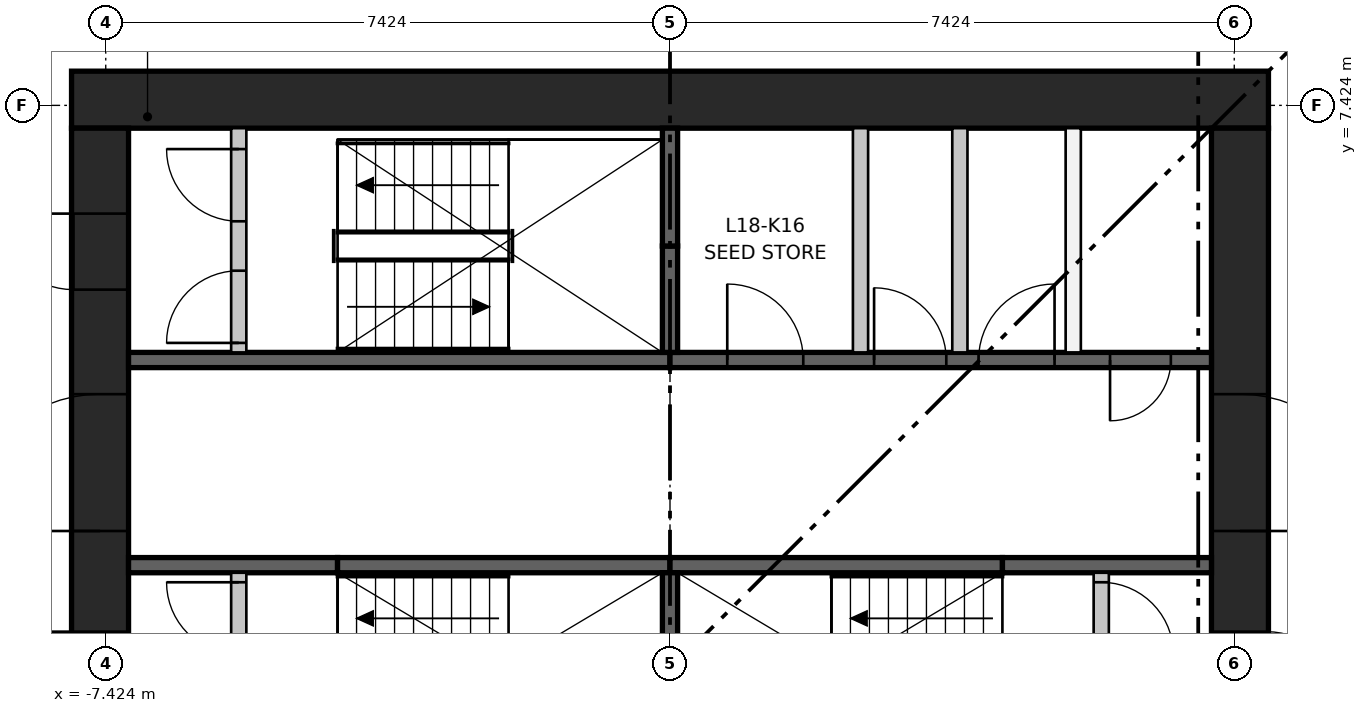
"""IFC4 building model, lengths in metres.
Left out: names, types, materials, properties, quantities, classifications, styles, units other than length and angle.
Written with IfcOpenShell. Run it as: python <this file> out.ifc"""

import sys

from ifc_helpers import new_model, si_unit, direction, frame, frame_2d, origin, place, context, subcontext, project, spatial, rectangle, extrude, element, fill, save


model = new_model("IFC4")
c1 = context("Model", 3, precision=1e-05, world=origin(), true_north=direction((0.0, 1.0)))
c2 = subcontext(c1, "Body", "Model", "MODEL_VIEW")
j1 = project(units=[si_unit("LENGTHUNIT", "METRE"), si_unit("PLANEANGLEUNIT", "RADIAN")], contexts=[c1])
p1 = place(None, origin())
s1 = spatial("IfcSite", under=j1, at=p1, CompositionType="ELEMENT")
p2 = place(p1, origin())
s2 = spatial("IfcBuilding", under=s1, at=p2, CompositionType="ELEMENT")
p3 = place(p2, frame((0.0, 0.0, 72.75)))
s3 = spatial("IfcBuildingStorey", under=s2, at=p3, CompositionType="ELEMENT", Elevation=72.75)
p4 = place(p3, frame((-7.874, 7.499, 0.0), z_axis=(0.0, 0.0, 1.0), x_axis=(1.0, 0.0, 0.0)))
e1 = element("IfcWall", 1, at=p4, inside=s3, PredefinedType="SHEAR", context=c2, shape_type="SweptSolid", body=[
    extrude(rectangle(XDim=15.748, YDim=0.75, at=frame_2d((7.874, 0.0))), origin(), (0.0, 0.0, 1.0), 3.65),
])
p5 = place(p3, frame((-7.499, -7.124, 0.0), z_axis=(0.0, 0.0, 1.0), x_axis=(0.0, 1.0, 0.0)))
e2 = element("IfcWall", 2, at=p5, inside=s3, PredefinedType="SHEAR", context=c2, shape_type="SweptSolid", body=[
    extrude(rectangle(XDim=14.248, YDim=0.75, at=frame_2d((7.124, 0.0))), origin(), (0.0, 0.0, 1.0), 3.65),
])
p6 = place(p5, frame((6.624, 0.0, 0.0)))
e3 = element("IfcOpeningElement", 3, at=p6, cuts=e2, PredefinedType="OPENING", context=c2, shape_type="SweptSolid", body=[
    extrude(rectangle(XDim=1.0, YDim=2.1, at=frame_2d((0.5, 1.05))), frame((0.0, 0.385, 0.0), z_axis=(0.0, -1.0, 0.0), x_axis=(1.0, 0.0, 0.0)), (0.0, 0.0, 1.0), 0.77),
])
p7 = place(p5, frame((3.5, 0.0, 0.0)))
e4 = element("IfcOpeningElement", 4, at=p7, cuts=e2, PredefinedType="OPENING", context=c2, shape_type="SweptSolid", body=[
    extrude(rectangle(XDim=1.8, YDim=2.1, at=frame_2d((0.9, 1.05))), frame((0.0, 0.385, 0.0), z_axis=(0.0, -1.0, 0.0), x_axis=(1.0, 0.0, 0.0)), (0.0, 0.0, 1.0), 0.77),
])
p8 = place(p5, frame((8.948, 0.0, 0.0)))
e5 = element("IfcOpeningElement", 5, at=p8, cuts=e2, PredefinedType="OPENING", context=c2, shape_type="SweptSolid", body=[
    extrude(rectangle(XDim=1.8, YDim=2.1, at=frame_2d((0.9, 1.05))), frame((0.0, 0.385, 0.0), z_axis=(0.0, -1.0, 0.0), x_axis=(1.0, 0.0, 0.0)), (0.0, 0.0, 1.0), 0.77),
])
p9 = place(p5, frame((12.124, 0.0, 0.0)))
e6 = element("IfcOpeningElement", 6, at=p9, cuts=e2, PredefinedType="OPENING", context=c2, shape_type="SweptSolid", body=[
    extrude(rectangle(XDim=1.0, YDim=2.1, at=frame_2d((0.5, 1.05))), frame((0.0, 0.385, 0.0), z_axis=(0.0, -1.0, 0.0), x_axis=(1.0, 0.0, 0.0)), (0.0, 0.0, 1.0), 0.77),
])
p10 = place(p3, frame((7.499, -7.124, 0.0), z_axis=(0.0, 0.0, 1.0), x_axis=(0.0, 1.0, 0.0)))
e7 = element("IfcWall", 7, at=p10, inside=s3, PredefinedType="SHEAR", context=c2, shape_type="SweptSolid", body=[
    extrude(rectangle(XDim=14.248, YDim=0.75, at=frame_2d((7.124, 0.0))), origin(), (0.0, 0.0, 1.0), 3.65),
])
p11 = place(p10, frame((6.624, 0.0, 0.0)))
e8 = element("IfcOpeningElement", 8, at=p11, cuts=e7, PredefinedType="OPENING", context=c2, shape_type="SweptSolid", body=[
    extrude(rectangle(XDim=1.0, YDim=2.1, at=frame_2d((0.5, 1.05))), frame((0.0, 0.385, 0.0), z_axis=(0.0, -1.0, 0.0), x_axis=(1.0, 0.0, 0.0)), (0.0, 0.0, 1.0), 0.77),
])
p12 = place(p10, frame((3.5, 0.0, 0.0)))
e9 = element("IfcOpeningElement", 9, at=p12, cuts=e7, PredefinedType="OPENING", context=c2, shape_type="SweptSolid", body=[
    extrude(rectangle(XDim=1.8, YDim=2.1, at=frame_2d((0.9, 1.05))), frame((0.0, 0.385, 0.0), z_axis=(0.0, -1.0, 0.0), x_axis=(1.0, 0.0, 0.0)), (0.0, 0.0, 1.0), 0.77),
])
p13 = place(p10, frame((8.948, 0.0, 0.0)))
e10 = element("IfcOpeningElement", 10, at=p13, cuts=e7, PredefinedType="OPENING", context=c2, shape_type="SweptSolid", body=[
    extrude(rectangle(XDim=1.8, YDim=2.1, at=frame_2d((0.9, 1.05))), frame((0.0, 0.385, 0.0), z_axis=(0.0, -1.0, 0.0), x_axis=(1.0, 0.0, 0.0)), (0.0, 0.0, 1.0), 0.77),
])
p14 = place(p3, frame((-7.124, 4.074, 0.0), z_axis=(0.0, 0.0, 1.0), x_axis=(1.0, 0.0, 0.0)))
e11 = element("IfcWall", 11, at=p14, inside=s3, PredefinedType="SHEAR", context=c2, shape_type="SweptSolid", body=[
    extrude(rectangle(XDim=7.124, YDim=0.2, at=frame_2d((3.562, 0.0))), origin(), (0.0, 0.0, 1.0), 3.3),
])
p15 = place(p3, frame((0.0, 4.074, 0.0), z_axis=(0.0, 0.0, 1.0), x_axis=(1.0, 0.0, 0.0)))
e12 = element("IfcWall", 12, at=p15, inside=s3, PredefinedType="SHEAR", context=c2, shape_type="SweptSolid", body=[
    extrude(rectangle(XDim=7.124, YDim=0.2, at=frame_2d((3.562, 0.0))), origin(), (0.0, 0.0, 1.0), 3.3),
])
p16 = place(p15, frame((0.753, 0.0, 0.0)))
e13 = element("IfcOpeningElement", 13, at=p16, cuts=e12, PredefinedType="OPENING", context=c2, shape_type="SweptSolid", body=[
    extrude(rectangle(XDim=1.0, YDim=2.1, at=frame_2d((0.5, 1.05))), frame((0.0, 0.11, 0.0), z_axis=(0.0, -1.0, 0.0), x_axis=(1.0, 0.0, 0.0)), (0.0, 0.0, 1.0), 0.22),
])
p17 = place(p15, frame((2.685, 0.0, 0.0)))
e14 = element("IfcOpeningElement", 14, at=p17, cuts=e12, PredefinedType="OPENING", context=c2, shape_type="SweptSolid", body=[
    extrude(rectangle(XDim=0.95, YDim=2.1, at=frame_2d((0.475, 1.05))), frame((0.0, 0.11, 0.0), z_axis=(0.0, -1.0, 0.0), x_axis=(1.0, 0.0, 0.0)), (0.0, 0.0, 1.0), 0.22),
])
p18 = place(p15, frame((4.06, 0.0, 0.0)))
e15 = element("IfcOpeningElement", 15, at=p18, cuts=e12, PredefinedType="OPENING", context=c2, shape_type="SweptSolid", body=[
    extrude(rectangle(XDim=1.0, YDim=2.1, at=frame_2d((0.5, 1.05))), frame((0.0, 0.11, 0.0), z_axis=(0.0, -1.0, 0.0), x_axis=(1.0, 0.0, 0.0)), (0.0, 0.0, 1.0), 0.22),
])
p19 = place(p15, frame((5.79, 0.0, 0.0)))
e16 = element("IfcOpeningElement", 16, at=p19, cuts=e12, PredefinedType="OPENING", context=c2, shape_type="SweptSolid", body=[
    extrude(rectangle(XDim=0.8, YDim=2.1, at=frame_2d((0.4, 1.05))), frame((0.0, 0.11, 0.0), z_axis=(0.0, -1.0, 0.0), x_axis=(1.0, 0.0, 0.0)), (0.0, 0.0, 1.0), 0.22),
])
p20 = place(p3, frame((-7.124, 1.375, 0.0), z_axis=(0.0, 0.0, 1.0), x_axis=(1.0, 0.0, 0.0)))
e17 = element("IfcWall", 17, at=p20, inside=s3, PredefinedType="SHEAR", context=c2, shape_type="SweptSolid", body=[
    extrude(rectangle(XDim=2.75, YDim=0.2, at=frame_2d((1.375, 0.0))), origin(), (0.0, 0.0, 1.0), 3.3),
])
for number, where, z_axis, x_axis in (
    (18, (-4.374, 1.375, 0.0), (0.0, 0.0, 1.0), (1.0, 0.0, 0.0)),
    (19, (0.0, 1.375, 0.0), (0.0, 0.0, 1.0), (1.0, 0.0, 0.0)),
):
    element("IfcWall", number, at=place(p3, frame(where, z_axis=z_axis, x_axis=x_axis)), inside=s3, PredefinedType="SHEAR", context=c2, shape_type="SweptSolid", body=[
        extrude(rectangle(XDim=4.374, YDim=0.2, at=frame_2d((2.187, 0.0))), origin(), (0.0, 0.0, 1.0), 3.3),
    ])
p21 = place(p3, frame((4.374, 1.375, 0.0), z_axis=(0.0, 0.0, 1.0), x_axis=(1.0, 0.0, 0.0)))
e20 = element("IfcWall", 20, at=p21, inside=s3, PredefinedType="SHEAR", context=c2, shape_type="SweptSolid", body=[
    extrude(rectangle(XDim=2.75, YDim=0.2, at=frame_2d((1.375, 0.0))), origin(), (0.0, 0.0, 1.0), 3.3),
])
p22 = place(p3, frame((0.0, -1.275, 0.0), z_axis=(0.0, 0.0, 1.0), x_axis=(0.0, 1.0, 0.0)))
e21 = element("IfcWall", 21, at=p22, inside=s3, PredefinedType="SHEAR", context=c2, shape_type="SweptSolid", body=[
    extrude(rectangle(XDim=2.55, YDim=0.2, at=frame_2d((1.275, 0.0))), origin(), (0.0, 0.0, 1.0), 3.3),
])
p23 = place(p3, frame((0.0, 4.174, 0.0), z_axis=(0.0, 0.0, 1.0), x_axis=(0.0, 1.0, 0.0)))
e22 = element("IfcWall", 22, at=p23, inside=s3, PredefinedType="SHEAR", context=c2, shape_type="SweptSolid", body=[
    extrude(rectangle(XDim=1.4, YDim=0.2, at=frame_2d((0.7, 0.0))), origin(), (0.0, 0.0, 1.0), 3.3),
])
p24 = place(p3, frame((0.0, 5.574, 0.0), z_axis=(0.0, 0.0, 1.0), x_axis=(0.0, 1.0, 0.0)))
e23 = element("IfcWall", 23, at=p24, inside=s3, PredefinedType="SHEAR", context=c2, shape_type="SweptSolid", body=[
    extrude(rectangle(XDim=1.55, YDim=0.2, at=frame_2d((0.775, 0.0))), origin(), (0.0, 0.0, 1.0), 3.3),
])
for number, where, z_axis, x_axis in (
    (24, (2.507, 4.174, 0.0), (0.0, 0.0, 1.0), (0.0, 1.0, 0.0)),
    (25, (3.814, 4.174, 0.0), (0.0, 0.0, 1.0), (0.0, 1.0, 0.0)),
    (26, (5.305, 4.174, 0.0), (0.0, 0.0, 1.0), (0.0, 1.0, 0.0)),
):
    element("IfcWall", number, at=place(p3, frame(where, z_axis=z_axis, x_axis=x_axis)), inside=s3, PredefinedType="PARTITIONING", context=c2, shape_type="SweptSolid", body=[
        extrude(rectangle(XDim=2.95, YDim=0.2, at=frame_2d((1.475, 0.0))), origin(), (0.0, 0.0, 1.0), 3.3),
    ])
p25 = place(p3, frame((-5.674, -1.275, 0.0), z_axis=(0.0, 0.0, 1.0), x_axis=(0.0, 1.0, 0.0)))
e27 = element("IfcWall", 27, at=p25, inside=s3, PredefinedType="PARTITIONING", context=c2, shape_type="SweptSolid", body=[
    extrude(rectangle(XDim=2.55, YDim=0.2, at=frame_2d((1.275, 0.0))), origin(), (0.0, 0.0, 1.0), 3.3),
])
p26 = place(p25, frame((0.125, 0.0, 0.0)))
e28 = element("IfcOpeningElement", 28, at=p26, cuts=e27, PredefinedType="OPENING", context=c2, shape_type="SweptSolid", body=[
    extrude(rectangle(XDim=0.95, YDim=2.1, at=frame_2d((0.475, 1.05))), frame((0.0, 0.11, 0.0), z_axis=(0.0, -1.0, 0.0), x_axis=(1.0, 0.0, 0.0)), (0.0, 0.0, 1.0), 0.22),
])
p27 = place(p25, frame((1.475, 0.0, 0.0)))
e29 = element("IfcOpeningElement", 29, at=p27, cuts=e27, PredefinedType="OPENING", context=c2, shape_type="SweptSolid", body=[
    extrude(rectangle(XDim=0.95, YDim=2.1, at=frame_2d((0.475, 1.05))), frame((0.0, 0.11, 0.0), z_axis=(0.0, -1.0, 0.0), x_axis=(1.0, 0.0, 0.0)), (0.0, 0.0, 1.0), 0.22),
])
p28 = place(p3, frame((5.674, -1.275, 0.0), z_axis=(0.0, 0.0, 1.0), x_axis=(0.0, 1.0, 0.0)))
e30 = element("IfcWall", 30, at=p28, inside=s3, PredefinedType="PARTITIONING", context=c2, shape_type="SweptSolid", body=[
    extrude(rectangle(XDim=2.55, YDim=0.2, at=frame_2d((1.275, 0.0))), origin(), (0.0, 0.0, 1.0), 3.3),
])
p29 = place(p28, frame((0.125, 0.0, 0.0)))
e31 = element("IfcOpeningElement", 31, at=p29, cuts=e30, PredefinedType="OPENING", context=c2, shape_type="SweptSolid", body=[
    extrude(rectangle(XDim=0.95, YDim=2.1, at=frame_2d((0.475, 1.05))), frame((0.0, 0.11, 0.0), z_axis=(0.0, -1.0, 0.0), x_axis=(1.0, 0.0, 0.0)), (0.0, 0.0, 1.0), 0.22),
])
p30 = place(p28, frame((1.475, 0.0, 0.0)))
e32 = element("IfcOpeningElement", 32, at=p30, cuts=e30, PredefinedType="OPENING", context=c2, shape_type="SweptSolid", body=[
    extrude(rectangle(XDim=0.95, YDim=2.1, at=frame_2d((0.475, 1.05))), frame((0.0, 0.11, 0.0), z_axis=(0.0, -1.0, 0.0), x_axis=(1.0, 0.0, 0.0)), (0.0, 0.0, 1.0), 0.22),
])
p31 = place(p3, frame((-5.674, 4.174, 0.0), z_axis=(0.0, 0.0, 1.0), x_axis=(0.0, 1.0, 0.0)))
e33 = element("IfcWall", 33, at=p31, inside=s3, PredefinedType="PARTITIONING", context=c2, shape_type="SweptSolid", body=[
    extrude(rectangle(XDim=2.95, YDim=0.2, at=frame_2d((1.475, 0.0))), origin(), (0.0, 0.0, 1.0), 3.3),
])
p32 = place(p31, frame((0.125, 0.0, 0.0)))
e34 = element("IfcOpeningElement", 34, at=p32, cuts=e33, PredefinedType="OPENING", context=c2, shape_type="SweptSolid", body=[
    extrude(rectangle(XDim=0.95, YDim=2.1, at=frame_2d((0.475, 1.05))), frame((0.0, 0.11, 0.0), z_axis=(0.0, -1.0, 0.0), x_axis=(1.0, 0.0, 0.0)), (0.0, 0.0, 1.0), 0.22),
])
p33 = place(p31, frame((1.725, 0.0, 0.0)))
e35 = element("IfcOpeningElement", 35, at=p33, cuts=e33, PredefinedType="OPENING", context=c2, shape_type="SweptSolid", body=[
    extrude(rectangle(XDim=0.95, YDim=2.1, at=frame_2d((0.475, 1.05))), frame((0.0, 0.11, 0.0), z_axis=(0.0, -1.0, 0.0), x_axis=(1.0, 0.0, 0.0)), (0.0, 0.0, 1.0), 0.22),
])
p34 = place(p27, origin())
e36 = element("IfcDoor", 36, at=p34, inside=s3, OperationType="SINGLE_SWING_RIGHT", PredefinedType="DOOR", context=c2, shape_type="SweptSolid", body=[
    extrude(rectangle(XDim=0.95, YDim=2.1, at=frame_2d((0.475, 1.05))), frame((0.0, 0.025, 0.0), z_axis=(0.0, -1.0, 0.0), x_axis=(1.0, 0.0, 0.0)), (0.0, 0.0, 1.0), 0.05),
])
fill(e29, e36)
p35 = place(p30, frame((0.95, 0.0, 0.0), z_axis=(0.0, 0.0, 1.0), x_axis=(-1.0, 0.0, 0.0)))
e37 = element("IfcDoor", 37, at=p35, inside=s3, OperationType="SINGLE_SWING_LEFT", PredefinedType="DOOR", context=c2, shape_type="SweptSolid", body=[
    extrude(rectangle(XDim=0.95, YDim=2.1, at=frame_2d((0.475, 1.05))), frame((0.0, 0.025, 0.0), z_axis=(0.0, -1.0, 0.0), x_axis=(1.0, 0.0, 0.0)), (0.0, 0.0, 1.0), 0.05),
])
fill(e32, e37)
p36 = place(p32, origin())
e38 = element("IfcDoor", 38, at=p36, inside=s3, OperationType="SINGLE_SWING_LEFT", PredefinedType="DOOR", context=c2, shape_type="SweptSolid", body=[
    extrude(rectangle(XDim=0.95, YDim=2.1, at=frame_2d((0.475, 1.05))), frame((0.0, 0.025, 0.0), z_axis=(0.0, -1.0, 0.0), x_axis=(1.0, 0.0, 0.0)), (0.0, 0.0, 1.0), 0.05),
])
fill(e34, e38)
p37 = place(p33, origin())
e39 = element("IfcDoor", 39, at=p37, inside=s3, OperationType="SINGLE_SWING_RIGHT", PredefinedType="DOOR", context=c2, shape_type="SweptSolid", body=[
    extrude(rectangle(XDim=0.95, YDim=2.1, at=frame_2d((0.475, 1.05))), frame((0.0, 0.025, 0.0), z_axis=(0.0, -1.0, 0.0), x_axis=(1.0, 0.0, 0.0)), (0.0, 0.0, 1.0), 0.05),
])
fill(e35, e39)
p38 = place(p16, origin())
e40 = element("IfcDoor", 40, at=p38, inside=s3, OperationType="SINGLE_SWING_LEFT", PredefinedType="DOOR", context=c2, shape_type="SweptSolid", body=[
    extrude(rectangle(XDim=1.0, YDim=2.1, at=frame_2d((0.5, 1.05))), frame((0.0, 0.025, 0.0), z_axis=(0.0, -1.0, 0.0), x_axis=(1.0, 0.0, 0.0)), (0.0, 0.0, 1.0), 0.05),
])
fill(e13, e40)
p39 = place(p17, origin())
e41 = element("IfcDoor", 41, at=p39, inside=s3, OperationType="SINGLE_SWING_LEFT", PredefinedType="DOOR", context=c2, shape_type="SweptSolid", body=[
    extrude(rectangle(XDim=0.95, YDim=2.1, at=frame_2d((0.475, 1.05))), frame((0.0, 0.025, 0.0), z_axis=(0.0, -1.0, 0.0), x_axis=(1.0, 0.0, 0.0)), (0.0, 0.0, 1.0), 0.05),
])
fill(e14, e41)
p40 = place(p18, origin())
e42 = element("IfcDoor", 42, at=p40, inside=s3, OperationType="SINGLE_SWING_RIGHT", PredefinedType="DOOR", context=c2, shape_type="SweptSolid", body=[
    extrude(rectangle(XDim=1.0, YDim=2.1, at=frame_2d((0.5, 1.05))), frame((0.0, 0.025, 0.0), z_axis=(0.0, -1.0, 0.0), x_axis=(1.0, 0.0, 0.0)), (0.0, 0.0, 1.0), 0.05),
])
fill(e15, e42)
p41 = place(p19, frame((0.8, 0.0, 0.0), z_axis=(0.0, 0.0, 1.0), x_axis=(-1.0, 0.0, 0.0)))
e43 = element("IfcDoor", 43, at=p41, inside=s3, OperationType="SINGLE_SWING_LEFT", PredefinedType="DOOR", context=c2, shape_type="SweptSolid", body=[
    extrude(rectangle(XDim=0.8, YDim=2.1, at=frame_2d((0.4, 1.05))), frame((0.0, 0.025, 0.0), z_axis=(0.0, -1.0, 0.0), x_axis=(1.0, 0.0, 0.0)), (0.0, 0.0, 1.0), 0.05),
])
fill(e16, e43)
p42 = place(p6, origin())
e44 = element("IfcDoor", 44, at=p42, inside=s3, OperationType="SINGLE_SWING_RIGHT", PredefinedType="DOOR", context=c2, shape_type="SweptSolid", body=[
    extrude(rectangle(XDim=1.0, YDim=2.1, at=frame_2d((0.5, 1.05))), frame((0.0, 0.375, 0.0), z_axis=(0.0, -1.0, 0.0), x_axis=(1.0, 0.0, 0.0)), (0.0, 0.0, 1.0), 0.05),
])
fill(e3, e44)
p43 = place(p8, origin())
e45 = element("IfcDoor", 45, at=p43, inside=s3, OperationType="DOUBLE_DOOR_SINGLE_SWING", PredefinedType="DOOR", context=c2, shape_type="SweptSolid", body=[
    extrude(rectangle(XDim=1.8, YDim=2.1, at=frame_2d((0.9, 1.05))), frame((0.0, 0.025, 0.0), z_axis=(0.0, -1.0, 0.0), x_axis=(1.0, 0.0, 0.0)), (0.0, 0.0, 1.0), 0.05),
])
fill(e5, e45)
p44 = place(p9, origin())
e46 = element("IfcDoor", 46, at=p44, inside=s3, OperationType="SINGLE_SWING_RIGHT", PredefinedType="DOOR", context=c2, shape_type="SweptSolid", body=[
    extrude(rectangle(XDim=1.0, YDim=2.1, at=frame_2d((0.5, 1.05))), frame((0.0, 0.375, 0.0), z_axis=(0.0, -1.0, 0.0), x_axis=(1.0, 0.0, 0.0)), (0.0, 0.0, 1.0), 0.05),
])
fill(e6, e46)
p45 = place(p11, frame((1.0, 0.0, 0.0), z_axis=(0.0, 0.0, 1.0), x_axis=(-1.0, 0.0, 0.0)))
e47 = element("IfcDoor", 47, at=p45, inside=s3, OperationType="SINGLE_SWING_LEFT", PredefinedType="DOOR", context=c2, shape_type="SweptSolid", body=[
    extrude(rectangle(XDim=1.0, YDim=2.1, at=frame_2d((0.5, 1.05))), frame((0.0, 0.375, 0.0), z_axis=(0.0, -1.0, 0.0), x_axis=(1.0, 0.0, 0.0)), (0.0, 0.0, 1.0), 0.05),
])
fill(e8, e47)
p46 = place(p13, frame((1.8, 0.0, 0.0), z_axis=(0.0, 0.0, 1.0), x_axis=(-1.0, 0.0, 0.0)))
e48 = element("IfcDoor", 48, at=p46, inside=s3, OperationType="DOUBLE_DOOR_SINGLE_SWING", PredefinedType="DOOR", context=c2, shape_type="SweptSolid", body=[
    extrude(rectangle(XDim=1.8, YDim=2.1, at=frame_2d((0.9, 1.05))), frame((0.0, 0.025, 0.0), z_axis=(0.0, -1.0, 0.0), x_axis=(1.0, 0.0, 0.0)), (0.0, 0.0, 1.0), 0.05),
])
fill(e10, e48)
save(model, sys.argv[1])
